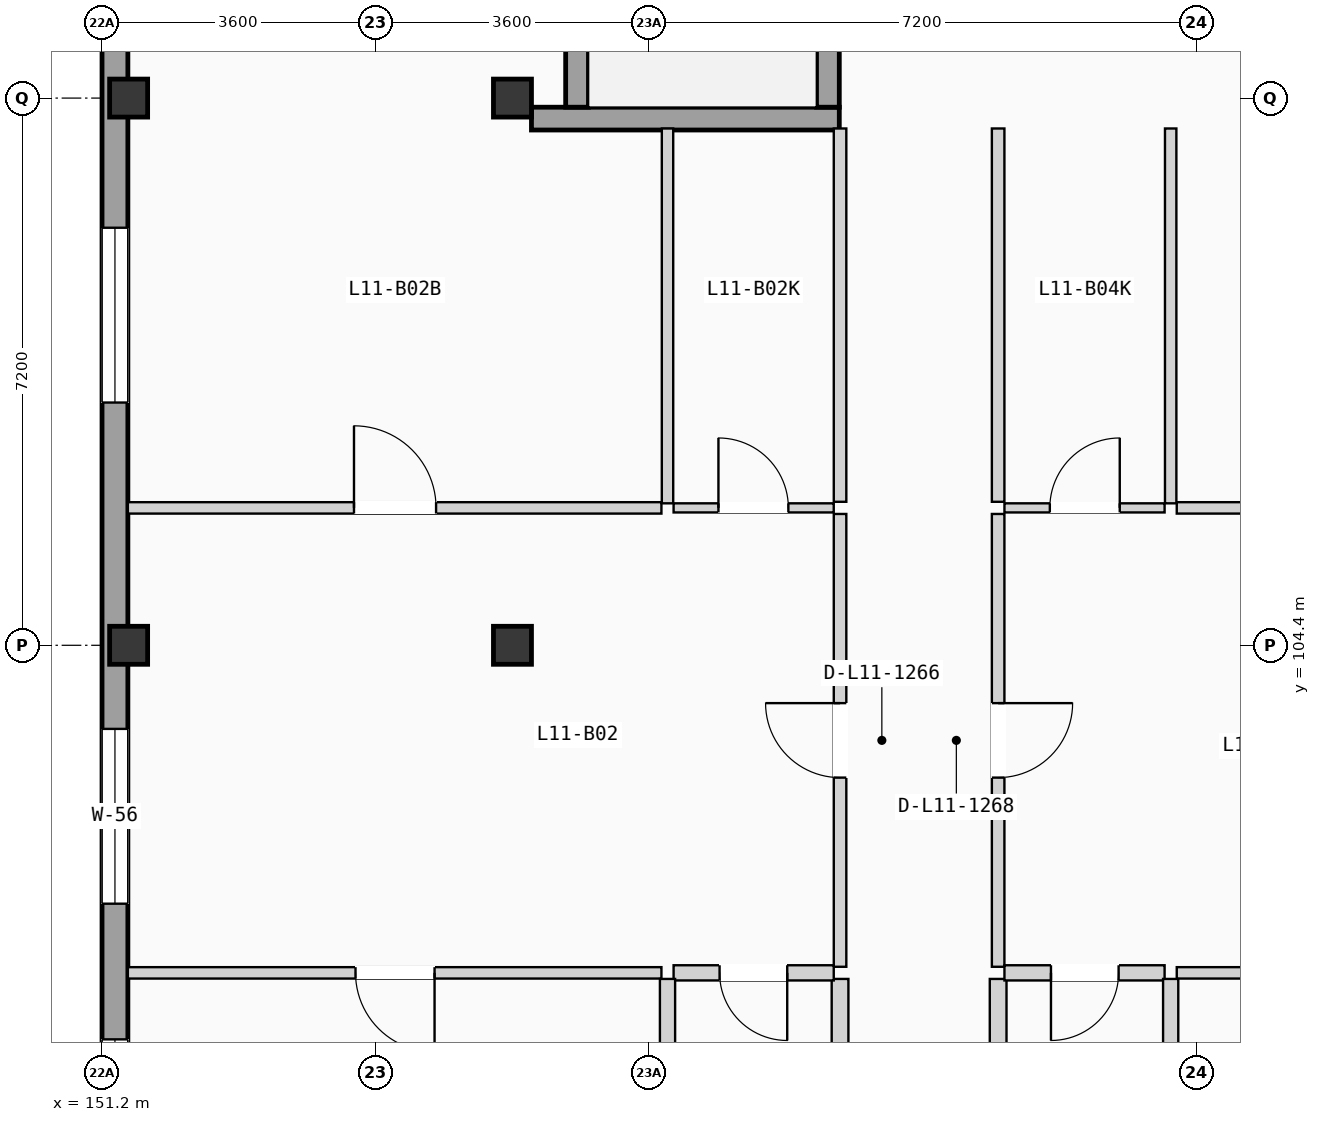
"""IFC4 building model, lengths in metres.
Left out: names, types, materials, properties, quantities, classifications, styles, units other than length and angle.
Written with IfcOpenShell. Run it as: python <this file> out.ifc"""

import sys

from ifc_helpers import new_model, si_unit, direction, frame, frame_2d, origin, origin_2d, place, context, subcontext, project, spatial, rectangle, extrude, element, fill, save


model = new_model("IFC4")
c1 = context("Model", 3, precision=1e-05, world=origin(), true_north=direction((0.0, 1.0)))
c2 = subcontext(c1, "Body", "Model", "MODEL_VIEW")
j1 = project(units=[si_unit("LENGTHUNIT", "METRE"), si_unit("PLANEANGLEUNIT", "RADIAN")], contexts=[c1])
p1 = place(None, origin())
s1 = spatial("IfcSite", under=j1, at=p1, CompositionType="ELEMENT")
p2 = place(p1, origin())
s2 = spatial("IfcBuilding", under=s1, at=p2, CompositionType="ELEMENT")
p3 = place(p2, frame((0.0, 0.0, 37.275)))
s3 = spatial("IfcBuildingStorey", under=s2, at=p3, CompositionType="ELEMENT", Elevation=37.275)
for number, where, z_axis, x_axis in (
    (1, (151.55, 104.4, 0.0), (0.0, 0.0, 1.0), (1.0, 0.0, 0.0)),
    (2, (151.55, 111.6, 0.0), (0.0, 0.0, 1.0), (1.0, 0.0, 0.0)),
    (3, (156.6, 104.4, 0.0), (0.0, 0.0, 1.0), (1.0, 0.0, 0.0)),
    (4, (156.6, 111.6, 0.0), (0.0, 0.0, 1.0), (1.0, 0.0, 0.0)),
):
    element("IfcColumn", number, at=place(p3, frame(where, z_axis=z_axis, x_axis=x_axis)), inside=s3, PredefinedType="COLUMN", context=c2, shape_type="SweptSolid", body=[
        extrude(rectangle(XDim=0.5, YDim=0.5, at=origin_2d()), origin(), (0.0, 0.0, 1.0), 3.15),
    ])
p4 = place(p3, frame((151.37, 68.74, 0.0), z_axis=(0.0, 0.0, 1.0), x_axis=(0.0, 1.0, 0.0)))
e5 = element("IfcWall", 5, at=p4, inside=s3, PredefinedType="SOLIDWALL", context=c2, shape_type="SweptSolid", body=[
    extrude(rectangle(XDim=49.72, YDim=0.34, at=frame_2d((24.86, 0.0))), origin(), (0.0, 0.0, 1.0), 2.6),
])
p5 = place(p4, frame((16.207, 0.0, 0.665)))
e6 = element("IfcOpeningElement", 6, at=p5, cuts=e5, PredefinedType="OPENING", context=c2, shape_type="SweptSolid", body=[
    extrude(rectangle(XDim=2.15, YDim=1.5, at=frame_2d((1.075, 0.75))), frame((0.0, 0.18, 0.0), z_axis=(0.0, -1.0, 0.0), x_axis=(1.0, 0.0, 0.0)), (0.0, 0.0, 1.0), 0.36),
])
p6 = place(p4, frame((9.078, 0.0, 0.515)))
e7 = element("IfcOpeningElement", 7, at=p6, cuts=e5, PredefinedType="OPENING", context=c2, shape_type="SweptSolid", body=[
    extrude(rectangle(XDim=2.15, YDim=1.65, at=frame_2d((1.075, 0.825))), frame((0.0, 0.18, 0.0), z_axis=(0.0, -1.0, 0.0), x_axis=(1.0, 0.0, 0.0)), (0.0, 0.0, 1.0), 0.36),
])
p7 = place(p4, frame((23.379, 0.0, 0.85)))
e8 = element("IfcOpeningElement", 8, at=p7, cuts=e5, PredefinedType="OPENING", context=c2, shape_type="SweptSolid", body=[
    extrude(rectangle(XDim=0.95, YDim=1.2, at=frame_2d((0.475, 0.6))), frame((0.0, 0.18, 0.0), z_axis=(0.0, -1.0, 0.0), x_axis=(1.0, 0.0, 0.0)), (0.0, 0.0, 1.0), 0.36),
])
p8 = place(p4, frame((32.26, 0.0, 0.9)))
e9 = element("IfcOpeningElement", 9, at=p8, cuts=e5, PredefinedType="OPENING", context=c2, shape_type="SweptSolid", body=[
    extrude(rectangle(XDim=2.3, YDim=1.2, at=frame_2d((1.15, 0.6))), frame((0.0, 0.18, 0.0), z_axis=(0.0, -1.0, 0.0), x_axis=(1.0, 0.0, 0.0)), (0.0, 0.0, 1.0), 0.36),
])
p9 = place(p4, frame((29.525, 0.0, 0.85)))
e10 = element("IfcOpeningElement", 10, at=p9, cuts=e5, PredefinedType="OPENING", context=c2, shape_type="SweptSolid", body=[
    extrude(rectangle(XDim=0.95, YDim=1.2, at=frame_2d((0.475, 0.6))), frame((0.0, 0.18, 0.0), z_axis=(0.0, -1.0, 0.0), x_axis=(1.0, 0.0, 0.0)), (0.0, 0.0, 1.0), 0.36),
])
p10 = place(p4, frame((38.854, 0.0, 0.665)))
e11 = element("IfcOpeningElement", 11, at=p10, cuts=e5, PredefinedType="OPENING", context=c2, shape_type="SweptSolid", body=[
    extrude(rectangle(XDim=2.3, YDim=1.5, at=frame_2d((1.15, 0.75))), frame((0.0, 0.18, 0.0), z_axis=(0.0, -1.0, 0.0), x_axis=(1.0, 0.0, 0.0)), (0.0, 0.0, 1.0), 0.36),
])
p11 = place(p3, frame((156.85, 111.33, 0.0), z_axis=(0.0, 0.0, 1.0), x_axis=(1.0, 0.0, 0.0)))
e12 = element("IfcWall", 12, at=p11, inside=s3, PredefinedType="SHEAR", context=c2, shape_type="SweptSolid", body=[
    extrude(rectangle(XDim=4.05, YDim=0.3, at=frame_2d((2.025, 0.0))), origin(), (0.0, 0.0, 1.0), 2.9),
])
p12 = place(p3, frame((157.45, 111.48, 0.0), z_axis=(0.0, 0.0, 1.0), x_axis=(0.0, 1.0, 0.0)))
e13 = element("IfcWall", 13, at=p12, inside=s3, PredefinedType="SHEAR", context=c2, shape_type="SweptSolid", body=[
    extrude(rectangle(XDim=7.0, YDim=0.3, at=frame_2d((3.5, 0.0))), origin(), (0.0, 0.0, 1.0), 2.9),
])
p13 = place(p3, frame((160.75, 111.48, 0.0), z_axis=(0.0, 0.0, 1.0), x_axis=(0.0, 1.0, 0.0)))
e14 = element("IfcWall", 14, at=p13, inside=s3, PredefinedType="SHEAR", context=c2, shape_type="SweptSolid", body=[
    extrude(rectangle(XDim=7.0, YDim=0.3, at=frame_2d((3.5, 0.0))), origin(), (0.0, 0.0, 1.0), 2.9),
])
p14 = place(p13, frame((5.625, 0.0, 0.0)))
e15 = element("IfcOpeningElement", 15, at=p14, cuts=e14, PredefinedType="OPENING", context=c2, shape_type="SweptSolid", body=[
    extrude(rectangle(XDim=1.15, YDim=2.12, at=frame_2d((0.575, 1.06))), frame((0.0, 0.16, 0.0), z_axis=(0.0, -1.0, 0.0), x_axis=(1.0, 0.0, 0.0)), (0.0, 0.0, 1.0), 0.32),
])
p15 = place(p3, frame((160.91, 100.17, 0.0), z_axis=(0.0, 0.0, 1.0), x_axis=(0.0, 1.0, 0.0)))
e16 = element("IfcWall", 16, at=p15, inside=s3, PredefinedType="PARTITIONING", context=c2, shape_type="SweptSolid", body=[
    extrude(rectangle(XDim=5.958, YDim=0.165, at=frame_2d((2.979, 0.0))), origin(), (0.0, 0.0, 1.0), 2.87),
])
p16 = place(p15, frame((2.489, 0.0, 0.0)))
e17 = element("IfcOpeningElement", 17, at=p16, cuts=e16, PredefinedType="OPENING", context=c2, shape_type="SweptSolid", body=[
    extrude(rectangle(XDim=0.98, YDim=2.08, at=frame_2d((0.49, 1.04))), frame((0.0, 0.093, 0.0), z_axis=(0.0, -1.0, 0.0), x_axis=(1.0, 0.0, 0.0)), (0.0, 0.0, 1.0), 0.185),
])
p17 = place(p3, frame((160.91, 95.098, 0.0), z_axis=(0.0, 0.0, 1.0), x_axis=(0.0, 1.0, 0.0)))
e18 = element("IfcWall", 18, at=p17, inside=s3, PredefinedType="PLUMBINGWALL", context=c2, shape_type="SweptSolid", body=[
    extrude(rectangle(XDim=4.912, YDim=0.22, at=frame_2d((2.456, 0.0))), origin(), (0.0, 0.0, 1.0), 2.87),
])
p18 = place(p3, frame((160.91, 106.288, 0.0), z_axis=(0.0, 0.0, 1.0), x_axis=(0.0, 1.0, 0.0)))
e19 = element("IfcWall", 19, at=p18, inside=s3, PredefinedType="PARTITIONING", context=c2, shape_type="SweptSolid", body=[
    extrude(rectangle(XDim=4.912, YDim=0.165, at=frame_2d((2.456, 0.0))), origin(), (0.0, 0.0, 1.0), 2.87),
])
p19 = place(p3, frame((162.99, 100.17, 0.0), z_axis=(0.0, 0.0, 1.0), x_axis=(0.0, 1.0, 0.0)))
e20 = element("IfcWall", 20, at=p19, inside=s3, PredefinedType="PARTITIONING", context=c2, shape_type="SweptSolid", body=[
    extrude(rectangle(XDim=5.958, YDim=0.165, at=frame_2d((2.979, 0.0))), origin(), (0.0, 0.0, 1.0), 2.87),
])
p20 = place(p19, frame((2.489, 0.0, 0.0)))
e21 = element("IfcOpeningElement", 21, at=p20, cuts=e20, PredefinedType="OPENING", context=c2, shape_type="SweptSolid", body=[
    extrude(rectangle(XDim=0.98, YDim=2.08, at=frame_2d((0.49, 1.04))), frame((0.0, 0.093, 0.0), z_axis=(0.0, -1.0, 0.0), x_axis=(1.0, 0.0, 0.0)), (0.0, 0.0, 1.0), 0.185),
])
p21 = place(p3, frame((162.99, 95.098, 0.0), z_axis=(0.0, 0.0, 1.0), x_axis=(0.0, 1.0, 0.0)))
e22 = element("IfcWall", 22, at=p21, inside=s3, PredefinedType="PLUMBINGWALL", context=c2, shape_type="SweptSolid", body=[
    extrude(rectangle(XDim=4.912, YDim=0.22, at=frame_2d((2.456, 0.0))), origin(), (0.0, 0.0, 1.0), 2.87),
])
p22 = place(p3, frame((162.99, 106.288, 0.0), z_axis=(0.0, 0.0, 1.0), x_axis=(0.0, 1.0, 0.0)))
e23 = element("IfcWall", 23, at=p22, inside=s3, PredefinedType="PARTITIONING", context=c2, shape_type="SweptSolid", body=[
    extrude(rectangle(XDim=4.912, YDim=0.165, at=frame_2d((2.456, 0.0))), origin(), (0.0, 0.0, 1.0), 2.87),
])
p23 = place(p3, frame((158.72, 100.09, 0.0), z_axis=(0.0, 0.0, 1.0), x_axis=(1.0, 0.0, 0.0)))
e24 = element("IfcWall", 24, at=p23, inside=s3, PredefinedType="PLUMBINGWALL", context=c2, shape_type="SweptSolid", body=[
    extrude(rectangle(XDim=2.107, YDim=0.2, at=frame_2d((1.053, 0.0))), origin(), (0.0, 0.0, 1.0), 2.87),
])
p24 = place(p23, frame((0.605, 0.0, 0.0)))
e25 = element("IfcOpeningElement", 25, at=p24, cuts=e24, PredefinedType="OPENING", context=c2, shape_type="SweptSolid", body=[
    extrude(rectangle(XDim=0.89, YDim=2.03, at=frame_2d((0.445, 1.015))), frame((0.0, 0.11, 0.0), z_axis=(0.0, -1.0, 0.0), x_axis=(1.0, 0.0, 0.0)), (0.0, 0.0, 1.0), 0.22),
])
p25 = place(p3, frame((158.72, 106.208, 0.0), z_axis=(0.0, 0.0, 1.0), x_axis=(1.0, 0.0, 0.0)))
e26 = element("IfcWall", 26, at=p25, inside=s3, PredefinedType="PARTITIONING", context=c2, shape_type="SweptSolid", body=[
    extrude(rectangle(XDim=2.107, YDim=0.12, at=frame_2d((1.053, 0.0))), origin(), (0.0, 0.0, 1.0), 2.87),
])
p26 = place(p25, frame((0.59, 0.0, 0.0)))
e27 = element("IfcOpeningElement", 27, at=p26, cuts=e26, PredefinedType="OPENING", context=c2, shape_type="SweptSolid", body=[
    extrude(rectangle(XDim=0.92, YDim=2.02, at=frame_2d((0.46, 1.01))), frame((0.0, 0.07, 0.0), z_axis=(0.0, -1.0, 0.0), x_axis=(1.0, 0.0, 0.0)), (0.0, 0.0, 1.0), 0.14),
])
p27 = place(p3, frame((151.54, 100.09, 0.0), z_axis=(0.0, 0.0, 1.0), x_axis=(1.0, 0.0, 0.0)))
e28 = element("IfcWall", 28, at=p27, inside=s3, PredefinedType="PARTITIONING", context=c2, shape_type="SweptSolid", body=[
    extrude(rectangle(XDim=7.02, YDim=0.15, at=frame_2d((3.51, 0.0))), origin(), (0.0, 0.0, 1.0), 2.87),
])
p28 = place(p27, frame((2.995, 0.0, 0.0)))
e29 = element("IfcOpeningElement", 29, at=p28, cuts=e28, PredefinedType="OPENING", context=c2, shape_type="SweptSolid", body=[
    extrude(rectangle(XDim=1.04, YDim=2.08, at=frame_2d((0.52, 1.04))), frame((0.0, 0.085, 0.0), z_axis=(0.0, -1.0, 0.0), x_axis=(1.0, 0.0, 0.0)), (0.0, 0.0, 1.0), 0.17),
])
p29 = place(p3, frame((151.54, 106.208, 0.0), z_axis=(0.0, 0.0, 1.0), x_axis=(1.0, 0.0, 0.0)))
e30 = element("IfcWall", 30, at=p29, inside=s3, PredefinedType="PARTITIONING", context=c2, shape_type="SweptSolid", body=[
    extrude(rectangle(XDim=7.02, YDim=0.15, at=frame_2d((3.51, 0.0))), origin(), (0.0, 0.0, 1.0), 2.87),
])
p30 = place(p29, frame((2.975, 0.0, 0.0)))
e31 = element("IfcOpeningElement", 31, at=p30, cuts=e30, PredefinedType="OPENING", context=c2, shape_type="SweptSolid", body=[
    extrude(rectangle(XDim=1.08, YDim=2.1, at=frame_2d((0.54, 1.05))), frame((0.0, 0.085, 0.0), z_axis=(0.0, -1.0, 0.0), x_axis=(1.0, 0.0, 0.0)), (0.0, 0.0, 1.0), 0.17),
])
p31 = place(p3, frame((158.64, 95.098, 0.0), z_axis=(0.0, 0.0, 1.0), x_axis=(0.0, 1.0, 0.0)))
e32 = element("IfcWall", 32, at=p31, inside=s3, PredefinedType="PLUMBINGWALL", context=c2, shape_type="SweptSolid", body=[
    extrude(rectangle(XDim=4.912, YDim=0.2, at=frame_2d((2.456, 0.0))), origin(), (0.0, 0.0, 1.0), 2.87),
])
p32 = place(p3, frame((158.64, 106.268, 0.0), z_axis=(0.0, 0.0, 1.0), x_axis=(0.0, 1.0, 0.0)))
e33 = element("IfcWall", 33, at=p32, inside=s3, PredefinedType="PARTITIONING", context=c2, shape_type="SweptSolid", body=[
    extrude(rectangle(XDim=4.932, YDim=0.15, at=frame_2d((2.466, 0.0))), origin(), (0.0, 0.0, 1.0), 2.87),
])
p33 = place(p3, frame((163.073, 100.09, 0.0), z_axis=(0.0, 0.0, 1.0), x_axis=(1.0, 0.0, 0.0)))
e34 = element("IfcWall", 34, at=p33, inside=s3, PredefinedType="PLUMBINGWALL", context=c2, shape_type="SweptSolid", body=[
    extrude(rectangle(XDim=2.107, YDim=0.2, at=frame_2d((1.053, 0.0))), origin(), (0.0, 0.0, 1.0), 2.87),
])
p34 = place(p33, frame((0.612, 0.0, 0.0)))
e35 = element("IfcOpeningElement", 35, at=p34, cuts=e34, PredefinedType="OPENING", context=c2, shape_type="SweptSolid", body=[
    extrude(rectangle(XDim=0.89, YDim=2.03, at=frame_2d((0.445, 1.015))), frame((0.0, 0.11, 0.0), z_axis=(0.0, -1.0, 0.0), x_axis=(1.0, 0.0, 0.0)), (0.0, 0.0, 1.0), 0.22),
])
p35 = place(p3, frame((163.073, 106.208, 0.0), z_axis=(0.0, 0.0, 1.0), x_axis=(1.0, 0.0, 0.0)))
e36 = element("IfcWall", 36, at=p35, inside=s3, PredefinedType="PARTITIONING", context=c2, shape_type="SweptSolid", body=[
    extrude(rectangle(XDim=2.107, YDim=0.12, at=frame_2d((1.053, 0.0))), origin(), (0.0, 0.0, 1.0), 2.87),
])
p36 = place(p35, frame((0.597, 0.0, 0.0)))
e37 = element("IfcOpeningElement", 37, at=p36, cuts=e36, PredefinedType="OPENING", context=c2, shape_type="SweptSolid", body=[
    extrude(rectangle(XDim=0.92, YDim=2.02, at=frame_2d((0.46, 1.01))), frame((0.0, 0.07, 0.0), z_axis=(0.0, -1.0, 0.0), x_axis=(1.0, 0.0, 0.0)), (0.0, 0.0, 1.0), 0.14),
])
p37 = place(p3, frame((165.34, 100.09, 0.0), z_axis=(0.0, 0.0, 1.0), x_axis=(1.0, 0.0, 0.0)))
e38 = element("IfcWall", 38, at=p37, inside=s3, PredefinedType="PARTITIONING", context=c2, shape_type="SweptSolid", body=[
    extrude(rectangle(XDim=7.12, YDim=0.15, at=frame_2d((3.56, 0.0))), origin(), (0.0, 0.0, 1.0), 2.87),
])
p38 = place(p37, frame((3.055, 0.0, 0.0)))
e39 = element("IfcOpeningElement", 39, at=p38, cuts=e38, PredefinedType="OPENING", context=c2, shape_type="SweptSolid", body=[
    extrude(rectangle(XDim=1.0, YDim=2.06, at=frame_2d((0.5, 1.03))), frame((0.0, 0.085, 0.0), z_axis=(0.0, -1.0, 0.0), x_axis=(1.0, 0.0, 0.0)), (0.0, 0.0, 1.0), 0.17),
])
p39 = place(p3, frame((165.34, 106.208, 0.0), z_axis=(0.0, 0.0, 1.0), x_axis=(1.0, 0.0, 0.0)))
e40 = element("IfcWall", 40, at=p39, inside=s3, PredefinedType="PARTITIONING", context=c2, shape_type="SweptSolid", body=[
    extrude(rectangle(XDim=7.12, YDim=0.15, at=frame_2d((3.56, 0.0))), origin(), (0.0, 0.0, 1.0), 2.87),
])
p40 = place(p39, frame((3.035, 0.0, 0.0)))
e41 = element("IfcOpeningElement", 41, at=p40, cuts=e40, PredefinedType="OPENING", context=c2, shape_type="SweptSolid", body=[
    extrude(rectangle(XDim=1.04, YDim=2.08, at=frame_2d((0.52, 1.04))), frame((0.0, 0.085, 0.0), z_axis=(0.0, -1.0, 0.0), x_axis=(1.0, 0.0, 0.0)), (0.0, 0.0, 1.0), 0.17),
])
p41 = place(p3, frame((165.26, 95.098, 0.0), z_axis=(0.0, 0.0, 1.0), x_axis=(0.0, 1.0, 0.0)))
e42 = element("IfcWall", 42, at=p41, inside=s3, PredefinedType="PLUMBINGWALL", context=c2, shape_type="SweptSolid", body=[
    extrude(rectangle(XDim=4.912, YDim=0.2, at=frame_2d((2.456, 0.0))), origin(), (0.0, 0.0, 1.0), 2.87),
])
p42 = place(p3, frame((165.26, 106.268, 0.0), z_axis=(0.0, 0.0, 1.0), x_axis=(0.0, 1.0, 0.0)))
e43 = element("IfcWall", 43, at=p42, inside=s3, PredefinedType="PARTITIONING", context=c2, shape_type="SweptSolid", body=[
    extrude(rectangle(XDim=4.932, YDim=0.15, at=frame_2d((2.466, 0.0))), origin(), (0.0, 0.0, 1.0), 2.87),
])
p43 = place(p8, origin())
e44 = element("IfcWindow", 44, at=p43, inside=s3, PartitioningType="DOUBLE_PANEL_VERTICAL", PredefinedType="WINDOW", context=c2, shape_type="SweptSolid", body=[
    extrude(rectangle(XDim=2.3, YDim=1.2, at=frame_2d((1.15, 0.6))), frame((0.0, 0.03, 0.0), z_axis=(0.0, -1.0, 0.0), x_axis=(1.0, 0.0, 0.0)), (0.0, 0.0, 1.0), 0.06),
])
fill(e9, e44)
p44 = place(p9, origin())
e45 = element("IfcWindow", 45, at=p44, inside=s3, PartitioningType="SINGLE_PANEL", PredefinedType="WINDOW", context=c2, shape_type="SweptSolid", body=[
    extrude(rectangle(XDim=0.95, YDim=1.2, at=frame_2d((0.475, 0.6))), frame((0.0, 0.03, 0.0), z_axis=(0.0, -1.0, 0.0), x_axis=(1.0, 0.0, 0.0)), (0.0, 0.0, 1.0), 0.06),
])
fill(e10, e45)
p45 = place(p10, origin())
e46 = element("IfcWindow", 46, at=p45, inside=s3, PartitioningType="DOUBLE_PANEL_VERTICAL", PredefinedType="WINDOW", context=c2, shape_type="SweptSolid", body=[
    extrude(rectangle(XDim=2.3, YDim=1.5, at=frame_2d((1.15, 0.75))), frame((0.0, 0.03, 0.0), z_axis=(0.0, -1.0, 0.0), x_axis=(1.0, 0.0, 0.0)), (0.0, 0.0, 1.0), 0.06),
])
fill(e11, e46)
p46 = place(p16, origin())
e47 = element("IfcDoor", 47, at=p46, inside=s3, OperationType="SINGLE_SWING_RIGHT", PredefinedType="DOOR", context=c2, shape_type="SweptSolid", body=[
    extrude(rectangle(XDim=0.98, YDim=2.08, at=frame_2d((0.49, 1.04))), frame((0.0, 0.025, 0.0), z_axis=(0.0, -1.0, 0.0), x_axis=(1.0, 0.0, 0.0)), (0.0, 0.0, 1.0), 0.05),
])
fill(e17, e47)
p47 = place(p20, frame((0.98, 0.0, 0.0), z_axis=(0.0, 0.0, 1.0), x_axis=(-1.0, 0.0, 0.0)))
e48 = element("IfcDoor", 48, at=p47, inside=s3, OperationType="SINGLE_SWING_RIGHT", PredefinedType="DOOR", context=c2, shape_type="SweptSolid", body=[
    extrude(rectangle(XDim=0.98, YDim=2.08, at=frame_2d((0.49, 1.04))), frame((0.0, 0.025, 0.0), z_axis=(0.0, -1.0, 0.0), x_axis=(1.0, 0.0, 0.0)), (0.0, 0.0, 1.0), 0.05),
])
fill(e21, e48)
p48 = place(p24, frame((0.89, 0.0, 0.0), z_axis=(0.0, 0.0, 1.0), x_axis=(-1.0, 0.0, 0.0)))
e49 = element("IfcDoor", 49, at=p48, inside=s3, OperationType="SINGLE_SWING_RIGHT", PredefinedType="DOOR", context=c2, shape_type="SweptSolid", body=[
    extrude(rectangle(XDim=0.89, YDim=2.03, at=frame_2d((0.445, 1.015))), frame((0.0, 0.025, 0.0), z_axis=(0.0, -1.0, 0.0), x_axis=(1.0, 0.0, 0.0)), (0.0, 0.0, 1.0), 0.05),
])
fill(e25, e49)
p49 = place(p26, origin())
e50 = element("IfcDoor", 50, at=p49, inside=s3, OperationType="SINGLE_SWING_LEFT", PredefinedType="DOOR", context=c2, shape_type="SweptSolid", body=[
    extrude(rectangle(XDim=0.92, YDim=2.02, at=frame_2d((0.46, 1.01))), frame((0.0, 0.025, 0.0), z_axis=(0.0, -1.0, 0.0), x_axis=(1.0, 0.0, 0.0)), (0.0, 0.0, 1.0), 0.05),
])
fill(e27, e50)
p50 = place(p28, frame((1.04, 0.0, 0.0), z_axis=(0.0, 0.0, 1.0), x_axis=(-1.0, 0.0, 0.0)))
e51 = element("IfcDoor", 51, at=p50, inside=s3, OperationType="SINGLE_SWING_RIGHT", PredefinedType="DOOR", context=c2, shape_type="SweptSolid", body=[
    extrude(rectangle(XDim=1.04, YDim=2.08, at=frame_2d((0.52, 1.04))), frame((0.0, 0.025, 0.0), z_axis=(0.0, -1.0, 0.0), x_axis=(1.0, 0.0, 0.0)), (0.0, 0.0, 1.0), 0.05),
])
fill(e29, e51)
p51 = place(p30, origin())
e52 = element("IfcDoor", 52, at=p51, inside=s3, OperationType="SINGLE_SWING_LEFT", PredefinedType="DOOR", context=c2, shape_type="SweptSolid", body=[
    extrude(rectangle(XDim=1.08, YDim=2.1, at=frame_2d((0.54, 1.05))), frame((0.0, 0.025, 0.0), z_axis=(0.0, -1.0, 0.0), x_axis=(1.0, 0.0, 0.0)), (0.0, 0.0, 1.0), 0.05),
])
fill(e31, e52)
p52 = place(p34, frame((0.89, 0.0, 0.0), z_axis=(0.0, 0.0, 1.0), x_axis=(-1.0, 0.0, 0.0)))
e53 = element("IfcDoor", 53, at=p52, inside=s3, OperationType="SINGLE_SWING_LEFT", PredefinedType="DOOR", context=c2, shape_type="SweptSolid", body=[
    extrude(rectangle(XDim=0.89, YDim=2.03, at=frame_2d((0.445, 1.015))), frame((0.0, 0.025, 0.0), z_axis=(0.0, -1.0, 0.0), x_axis=(1.0, 0.0, 0.0)), (0.0, 0.0, 1.0), 0.05),
])
fill(e35, e53)
p53 = place(p36, origin())
e54 = element("IfcDoor", 54, at=p53, inside=s3, OperationType="SINGLE_SWING_RIGHT", PredefinedType="DOOR", context=c2, shape_type="SweptSolid", body=[
    extrude(rectangle(XDim=0.92, YDim=2.02, at=frame_2d((0.46, 1.01))), frame((0.0, 0.025, 0.0), z_axis=(0.0, -1.0, 0.0), x_axis=(1.0, 0.0, 0.0)), (0.0, 0.0, 1.0), 0.05),
])
fill(e37, e54)
save(model, sys.argv[1])
